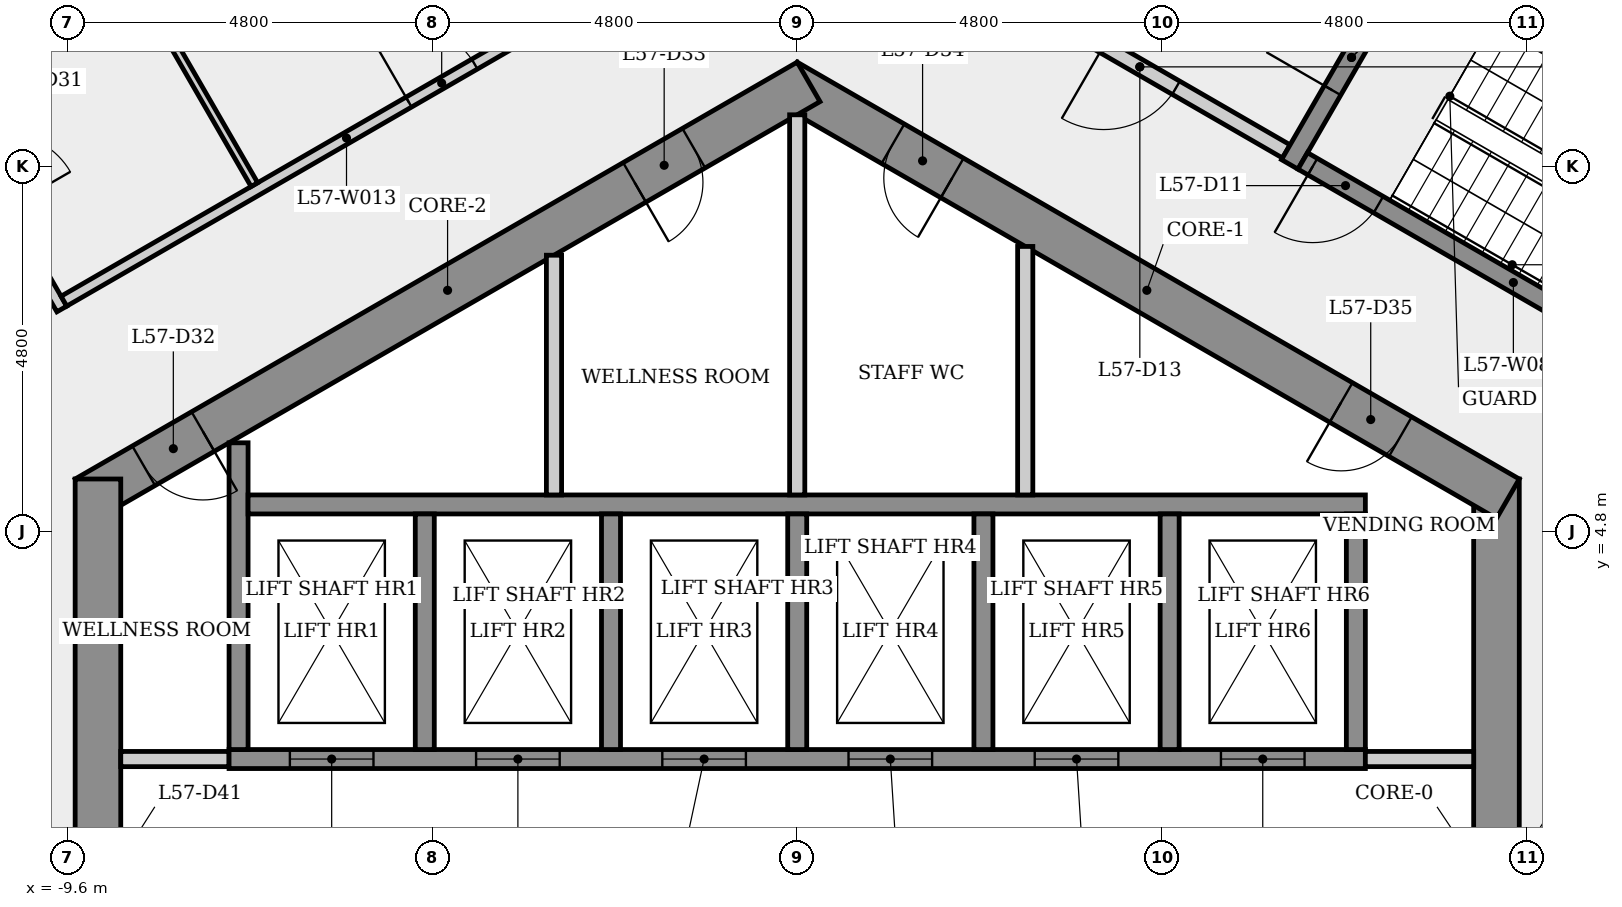
"""IFC4 building model, lengths in metres.
Left out: names, types, materials, properties, quantities, classifications, styles, units other than length and angle.
Written with IfcOpenShell. Run it as: python <this file> out.ifc"""

import sys

from ifc_helpers import new_model, si_unit, direction, frame, frame_2d, origin, place, context, subcontext, project, spatial, rectangle, extrude, element, fill, save


model = new_model("IFC4")
c1 = context("Model", 3, precision=1e-05, world=origin(), true_north=direction((0.0, 1.0)))
c2 = subcontext(c1, "Body", "Model", "MODEL_VIEW")
j1 = project(units=[si_unit("LENGTHUNIT", "METRE"), si_unit("PLANEANGLEUNIT", "RADIAN")], contexts=[c1])
p1 = place(None, origin())
s1 = spatial("IfcSite", under=j1, at=p1, CompositionType="ELEMENT")
p2 = place(p1, origin())
s2 = spatial("IfcBuilding", under=s1, at=p2, CompositionType="ELEMENT")
p3 = place(p2, frame((0.0, 0.0, 214.1)))
s3 = spatial("IfcBuildingStorey", under=s2, at=p3, CompositionType="ELEMENT", Elevation=214.1)
p4 = place(p3, frame((9.2, -5.485, 0.0), z_axis=(0.0, 0.0, 1.0), x_axis=(0.0, 1.0, 0.0)))
e1 = element("IfcWall", 1, at=p4, inside=s3, PredefinedType="SHEAR", context=c2, shape_type="SweptSolid", body=[
    extrude(rectangle(XDim=10.97, YDim=0.6, at=frame_2d((5.485, 0.0))), origin(), (0.0, 0.0, 1.0), 4.8),
])
p5 = place(p4, frame((4.685, 0.0, 0.0)))
e2 = element("IfcOpeningElement", 2, at=p5, cuts=e1, PredefinedType="OPENING", context=c2, shape_type="SweptSolid", body=[
    extrude(rectangle(XDim=1.6, YDim=2.1, at=frame_2d((0.8, 1.05))), frame((0.0, 0.31, 0.0), z_axis=(0.0, -1.0, 0.0), x_axis=(1.0, 0.0, 0.0)), (0.0, 0.0, 1.0), 0.62),
])
p6 = place(p3, frame((9.35, 5.225, 0.0), z_axis=(0.0, 0.0, 1.0), x_axis=(-0.866023993627, 0.500002442456, 0.0)))
e3 = element("IfcWall", 3, at=p6, inside=s3, PredefinedType="SHEAR", context=c2, shape_type="SweptSolid", body=[
    extrude(rectangle(XDim=10.97, YDim=0.6, at=frame_2d((5.485, 0.0))), origin(), (0.0, 0.0, 1.0), 4.8),
])
p7 = place(p6, frame((8.442, 0.0, 0.0)))
e4 = element("IfcOpeningElement", 4, at=p7, cuts=e3, PredefinedType="OPENING", context=c2, shape_type="SweptSolid", body=[
    extrude(rectangle(XDim=0.9, YDim=2.1, at=frame_2d((0.45, 1.05))), frame((0.0, 0.31, 0.0), z_axis=(0.0, -1.0, 0.0), x_axis=(1.0, 0.0, 0.0)), (0.0, 0.0, 1.0), 0.62),
])
p8 = place(p6, frame((1.634, 0.0, 0.0)))
e5 = element("IfcOpeningElement", 5, at=p8, cuts=e3, PredefinedType="OPENING", context=c2, shape_type="SweptSolid", body=[
    extrude(rectangle(XDim=0.9, YDim=2.1, at=frame_2d((0.45, 1.05))), frame((0.0, 0.31, 0.0), z_axis=(0.0, -1.0, 0.0), x_axis=(1.0, 0.0, 0.0)), (0.0, 0.0, 1.0), 0.62),
])
p9 = place(p3, frame((0.15, 10.71, 0.0), z_axis=(0.0, 0.0, 1.0), x_axis=(-0.866023993627, -0.500002442456, 0.0)))
e6 = element("IfcWall", 6, at=p9, inside=s3, PredefinedType="SHEAR", context=c2, shape_type="SweptSolid", body=[
    extrude(rectangle(XDim=10.97, YDim=0.6, at=frame_2d((5.485, 0.0))), origin(), (0.0, 0.0, 1.0), 4.8),
])
p10 = place(p9, frame((9.201, 0.0, 0.0)))
e7 = element("IfcOpeningElement", 7, at=p10, cuts=e6, PredefinedType="OPENING", context=c2, shape_type="SweptSolid", body=[
    extrude(rectangle(XDim=0.9, YDim=2.1, at=frame_2d((0.45, 1.05))), frame((0.0, 0.31, 0.0), z_axis=(0.0, -1.0, 0.0), x_axis=(1.0, 0.0, 0.0)), (0.0, 0.0, 1.0), 0.62),
])
p11 = place(p9, frame((1.744, 0.0, 0.0)))
e8 = element("IfcOpeningElement", 8, at=p11, cuts=e6, PredefinedType="OPENING", context=c2, shape_type="SweptSolid", body=[
    extrude(rectangle(XDim=0.9, YDim=2.1, at=frame_2d((0.45, 1.05))), frame((0.0, 0.31, 0.0), z_axis=(0.0, -1.0, 0.0), x_axis=(1.0, 0.0, 0.0)), (0.0, 0.0, 1.0), 0.62),
])
p12 = place(p3, frame((-9.2, 5.485, 0.0), z_axis=(0.0, 0.0, 1.0), x_axis=(0.0, -1.0, 0.0)))
e9 = element("IfcWall", 9, at=p12, inside=s3, PredefinedType="SHEAR", context=c2, shape_type="SweptSolid", body=[
    extrude(rectangle(XDim=10.97, YDim=0.6, at=frame_2d((5.485, 0.0))), origin(), (0.0, 0.0, 1.0), 4.8),
])
p13 = place(p12, frame((8.516, 0.0, 0.0)))
e10 = element("IfcOpeningElement", 10, at=p13, cuts=e9, PredefinedType="OPENING", context=c2, shape_type="SweptSolid", body=[
    extrude(rectangle(XDim=0.9, YDim=2.1, at=frame_2d((0.45, 1.05))), frame((0.0, 0.31, 0.0), z_axis=(0.0, -1.0, 0.0), x_axis=(1.0, 0.0, 0.0)), (0.0, 0.0, 1.0), 0.62),
])
p14 = place(p12, frame((4.685, 0.0, 0.0)))
e11 = element("IfcOpeningElement", 11, at=p14, cuts=e9, PredefinedType="OPENING", context=c2, shape_type="SweptSolid", body=[
    extrude(rectangle(XDim=1.6, YDim=2.1, at=frame_2d((0.8, 1.05))), frame((0.0, 0.31, 0.0), z_axis=(0.0, -1.0, 0.0), x_axis=(1.0, 0.0, 0.0)), (0.0, 0.0, 1.0), 0.62),
])
p15 = place(p3, frame((-11.646, 11.134, 0.0), z_axis=(0.0, 0.0, 1.0), x_axis=(0.500044270822, -0.865999842505, 0.0)))
e12 = element("IfcWall", 12, at=p15, inside=s3, PredefinedType="PARTITIONING", context=c2, shape_type="SweptSolid", body=[
    extrude(rectangle(XDim=3.94, YDim=0.15, at=frame_2d((1.97, 0.0))), origin(), (0.0, 0.0, 1.0), 4.45),
])
p16 = place(p15, frame((1.433, 0.0, 0.0)))
e13 = element("IfcOpeningElement", 13, at=p16, cuts=e12, PredefinedType="OPENING", context=c2, shape_type="SweptSolid", body=[
    extrude(rectangle(XDim=1.0, YDim=2.1, at=frame_2d((0.5, 1.05))), frame((0.0, 0.085, 0.0), z_axis=(0.0, -1.0, 0.0), x_axis=(1.0, 0.0, 0.0)), (0.0, 0.0, 1.0), 0.17),
])
p17 = place(p3, frame((-9.648, 7.824, 0.0), z_axis=(0.0, 0.0, 1.0), x_axis=(0.866024597333, 0.500001396812, 0.0)))
e14 = element("IfcWall", 14, at=p17, inside=s3, PredefinedType="PARTITIONING", context=c2, shape_type="SweptSolid", body=[
    extrude(rectangle(XDim=8.586, YDim=0.15, at=frame_2d((4.293, 0.0))), origin(), (0.0, 0.0, 1.0), 4.45),
])
p18 = place(p17, frame((5.239, 0.0, 0.0)))
e15 = element("IfcOpeningElement", 15, at=p18, cuts=e14, PredefinedType="OPENING", context=c2, shape_type="SweptSolid", body=[
    extrude(rectangle(XDim=1.0, YDim=2.1, at=frame_2d((0.5, 1.05))), frame((0.0, 0.085, 0.0), z_axis=(0.0, -1.0, 0.0), x_axis=(1.0, 0.0, 0.0)), (0.0, 0.0, 1.0), 0.17),
])
p19 = place(p3, frame((-8.9, 1.8, 0.0), z_axis=(0.0, 0.0, 1.0), x_axis=(1.0, 0.0, 0.0)))
e16 = element("IfcWall", 16, at=p19, inside=s3, PredefinedType="PARTITIONING", context=c2, shape_type="SweptSolid", body=[
    extrude(rectangle(XDim=1.425, YDim=0.2, at=frame_2d((0.712, 0.0))), origin(), (0.0, 0.0, 1.0), 4.45),
])
p20 = place(p3, frame((-7.475, 1.8, 0.0), z_axis=(0.0, 0.0, 1.0), x_axis=(1.0, 0.0, 0.0)))
e17 = element("IfcWall", 17, at=p20, inside=s3, PredefinedType="SHEAR", context=c2, shape_type="SweptSolid", body=[
    extrude(rectangle(XDim=14.95, YDim=0.25, at=frame_2d((7.475, 0.0))), origin(), (0.0, 0.0, 1.0), 4.45),
])
p21 = place(p20, frame((0.8, 0.0, 0.0)))
e18 = element("IfcOpeningElement", 18, at=p21, cuts=e17, PredefinedType="OPENING", context=c2, shape_type="SweptSolid", body=[
    extrude(rectangle(XDim=1.1, YDim=2.1, at=frame_2d((0.55, 1.05))), frame((0.0, 0.135, 0.0), z_axis=(0.0, -1.0, 0.0), x_axis=(1.0, 0.0, 0.0)), (0.0, 0.0, 1.0), 0.27),
])
p22 = place(p20, frame((3.25, 0.0, 0.0)))
e19 = element("IfcOpeningElement", 19, at=p22, cuts=e17, PredefinedType="OPENING", context=c2, shape_type="SweptSolid", body=[
    extrude(rectangle(XDim=1.1, YDim=2.1, at=frame_2d((0.55, 1.05))), frame((0.0, 0.135, 0.0), z_axis=(0.0, -1.0, 0.0), x_axis=(1.0, 0.0, 0.0)), (0.0, 0.0, 1.0), 0.27),
])
p23 = place(p20, frame((5.7, 0.0, 0.0)))
e20 = element("IfcOpeningElement", 20, at=p23, cuts=e17, PredefinedType="OPENING", context=c2, shape_type="SweptSolid", body=[
    extrude(rectangle(XDim=1.1, YDim=2.1, at=frame_2d((0.55, 1.05))), frame((0.0, 0.135, 0.0), z_axis=(0.0, -1.0, 0.0), x_axis=(1.0, 0.0, 0.0)), (0.0, 0.0, 1.0), 0.27),
])
p24 = place(p20, frame((8.15, 0.0, 0.0)))
e21 = element("IfcOpeningElement", 21, at=p24, cuts=e17, PredefinedType="OPENING", context=c2, shape_type="SweptSolid", body=[
    extrude(rectangle(XDim=1.1, YDim=2.1, at=frame_2d((0.55, 1.05))), frame((0.0, 0.135, 0.0), z_axis=(0.0, -1.0, 0.0), x_axis=(1.0, 0.0, 0.0)), (0.0, 0.0, 1.0), 0.27),
])
p25 = place(p20, frame((10.6, 0.0, 0.0)))
e22 = element("IfcOpeningElement", 22, at=p25, cuts=e17, PredefinedType="OPENING", context=c2, shape_type="SweptSolid", body=[
    extrude(rectangle(XDim=1.1, YDim=2.1, at=frame_2d((0.55, 1.05))), frame((0.0, 0.135, 0.0), z_axis=(0.0, -1.0, 0.0), x_axis=(1.0, 0.0, 0.0)), (0.0, 0.0, 1.0), 0.27),
])
p26 = place(p20, frame((13.05, 0.0, 0.0)))
e23 = element("IfcOpeningElement", 23, at=p26, cuts=e17, PredefinedType="OPENING", context=c2, shape_type="SweptSolid", body=[
    extrude(rectangle(XDim=1.1, YDim=2.1, at=frame_2d((0.55, 1.05))), frame((0.0, 0.135, 0.0), z_axis=(0.0, -1.0, 0.0), x_axis=(1.0, 0.0, 0.0)), (0.0, 0.0, 1.0), 0.27),
])
p27 = place(p3, frame((-7.35, 1.925, 0.0), z_axis=(0.0, 0.0, 1.0), x_axis=(0.0, 1.0, 0.0)))
e24 = element("IfcWall", 24, at=p27, inside=s3, PredefinedType="SHEAR", context=c2, shape_type="SweptSolid", body=[
    extrude(rectangle(XDim=4.036, YDim=0.25, at=frame_2d((2.018, 0.0))), origin(), (0.0, 0.0, 1.0), 4.45),
])
p28 = place(p3, frame((-7.225, 5.15, 0.0), z_axis=(0.0, 0.0, 1.0), x_axis=(1.0, 0.0, 0.0)))
e25 = element("IfcWall", 25, at=p28, inside=s3, PredefinedType="SHEAR", context=c2, shape_type="SweptSolid", body=[
    extrude(rectangle(XDim=14.7, YDim=0.25, at=frame_2d((7.35, 0.0))), origin(), (0.0, 0.0, 1.0), 4.45),
])
p29 = place(p3, frame((-7.142, 9.358, 0.0), z_axis=(0.0, 0.0, 1.0), x_axis=(-0.500010221068, 0.866019502567, 0.0)))
e26 = element("IfcWall", 26, at=p29, inside=s3, PredefinedType="PARTITIONING", context=c2, shape_type="SweptSolid", body=[
    extrude(rectangle(XDim=6.511, YDim=0.1, at=frame_2d((3.256, 0.0))), origin(), (0.0, 0.0, 1.0), 2.825),
])
p30 = place(p3, frame((-4.9, 5.025, 0.0), z_axis=(0.0, 0.0, 1.0), x_axis=(0.0, -1.0, 0.0)))
e27 = element("IfcWall", 27, at=p30, inside=s3, PredefinedType="SHEAR", context=c2, shape_type="SweptSolid", body=[
    extrude(rectangle(XDim=3.1, YDim=0.25, at=frame_2d((1.55, 0.0))), origin(), (0.0, 0.0, 1.0), 4.8),
])
p31 = place(p3, frame((-3.2, 8.429, 0.0), z_axis=(0.0, 0.0, 1.0), x_axis=(0.0, -1.0, 0.0)))
e28 = element("IfcWall", 28, at=p31, inside=s3, PredefinedType="PARTITIONING", context=c2, shape_type="SweptSolid", body=[
    extrude(rectangle(XDim=3.154, YDim=0.2, at=frame_2d((1.577, 0.0))), origin(), (0.0, 0.0, 1.0), 4.45),
])
for number, where, z_axis, x_axis in (
    (29, (-2.45, 5.025, 0.0), (0.0, 0.0, 1.0), (0.0, -1.0, 0.0)),
    (30, (0.0, 5.025, 0.0), (0.0, 0.0, 1.0), (0.0, -1.0, 0.0)),
):
    element("IfcWall", number, at=place(p3, frame(where, z_axis=z_axis, x_axis=x_axis)), inside=s3, PredefinedType="SHEAR", context=c2, shape_type="SweptSolid", body=[
        extrude(rectangle(XDim=3.1, YDim=0.25, at=frame_2d((1.55, 0.0))), origin(), (0.0, 0.0, 1.0), 4.8),
    ])
p32 = place(p3, frame((0.0, 10.277, 0.0), z_axis=(0.0, 0.0, 1.0), x_axis=(0.0, -1.0, 0.0)))
e31 = element("IfcWall", 31, at=p32, inside=s3, PredefinedType="PARTITIONING", context=c2, shape_type="SweptSolid", body=[
    extrude(rectangle(XDim=5.002, YDim=0.2, at=frame_2d((2.501, 0.0))), origin(), (0.0, 0.0, 1.0), 4.45),
])
p33 = place(p3, frame((2.45, 5.025, 0.0), z_axis=(0.0, 0.0, 1.0), x_axis=(0.0, -1.0, 0.0)))
e32 = element("IfcWall", 32, at=p33, inside=s3, PredefinedType="SHEAR", context=c2, shape_type="SweptSolid", body=[
    extrude(rectangle(XDim=3.1, YDim=0.25, at=frame_2d((1.55, 0.0))), origin(), (0.0, 0.0, 1.0), 4.8),
])
p34 = place(p3, frame((3.0, 8.545, 0.0), z_axis=(0.0, 0.0, 1.0), x_axis=(0.0, -1.0, 0.0)))
e33 = element("IfcWall", 33, at=p34, inside=s3, PredefinedType="PARTITIONING", context=c2, shape_type="SweptSolid", body=[
    extrude(rectangle(XDim=3.27, YDim=0.2, at=frame_2d((1.635, 0.0))), origin(), (0.0, 0.0, 1.0), 4.45),
])
p35 = place(p3, frame((4.9, 5.025, 0.0), z_axis=(0.0, 0.0, 1.0), x_axis=(0.0, -1.0, 0.0)))
e34 = element("IfcWall", 34, at=p35, inside=s3, PredefinedType="SHEAR", context=c2, shape_type="SweptSolid", body=[
    extrude(rectangle(XDim=3.1, YDim=0.25, at=frame_2d((1.55, 0.0))), origin(), (0.0, 0.0, 1.0), 4.8),
])
p36 = place(p3, frame((6.435, 9.795, 0.0), z_axis=(0.0, 0.0, 1.0), x_axis=(-0.866012907634, 0.500021643343, 0.0)))
e35 = element("IfcWall", 35, at=p36, inside=s3, PredefinedType="PARTITIONING", context=c2, shape_type="SweptSolid", body=[
    extrude(rectangle(XDim=4.45, YDim=0.2, at=frame_2d((2.225, 0.0))), origin(), (0.0, 0.0, 1.0), 4.45),
])
p37 = place(p36, frame((1.675, 0.0, 0.0)))
e36 = element("IfcOpeningElement", 36, at=p37, cuts=e35, PredefinedType="OPENING", context=c2, shape_type="SweptSolid", body=[
    extrude(rectangle(XDim=1.1, YDim=2.1, at=frame_2d((0.55, 1.05))), frame((0.0, 0.11, 0.0), z_axis=(0.0, -1.0, 0.0), x_axis=(1.0, 0.0, 0.0)), (0.0, 0.0, 1.0), 0.22),
])
p38 = place(p3, frame((6.48, 9.624, 0.0), z_axis=(0.0, 0.0, 1.0), x_axis=(0.500017246033, 0.866015446554, 0.0)))
e37 = element("IfcWall", 37, at=p38, inside=s3, PredefinedType="SHEAR", context=c2, shape_type="SweptSolid", body=[
    extrude(rectangle(XDim=3.25, YDim=0.25, at=frame_2d((1.625, 0.0))), origin(), (0.0, 0.0, 1.0), 4.45),
])
p39 = place(p38, frame((1.125, 0.0, 0.0)))
e38 = element("IfcOpeningElement", 38, at=p39, cuts=e37, PredefinedType="OPENING", context=c2, shape_type="SweptSolid", body=[
    extrude(rectangle(XDim=1.0, YDim=2.1, at=frame_2d((0.5, 1.05))), frame((0.0, 0.135, 0.0), z_axis=(0.0, -1.0, 0.0), x_axis=(1.0, 0.0, 0.0)), (0.0, 0.0, 1.0), 0.27),
])
p40 = place(p3, frame((7.475, 1.8, 0.0), z_axis=(0.0, 0.0, 1.0), x_axis=(1.0, 0.0, 0.0)))
e39 = element("IfcWall", 39, at=p40, inside=s3, PredefinedType="PARTITIONING", context=c2, shape_type="SweptSolid", body=[
    extrude(rectangle(XDim=1.425, YDim=0.2, at=frame_2d((0.712, 0.0))), origin(), (0.0, 0.0, 1.0), 4.45),
])
p41 = place(p3, frame((7.35, 5.025, 0.0), z_axis=(0.0, 0.0, 1.0), x_axis=(0.0, -1.0, 0.0)))
e40 = element("IfcWall", 40, at=p41, inside=s3, PredefinedType="SHEAR", context=c2, shape_type="SweptSolid", body=[
    extrude(rectangle(XDim=3.1, YDim=0.25, at=frame_2d((1.55, 0.0))), origin(), (0.0, 0.0, 1.0), 4.8),
])
p42 = place(p3, frame((8.151, 12.268, 0.0), z_axis=(0.0, 0.0, 1.0), x_axis=(0.866025499775, -0.499999833739, 0.0)))
e41 = element("IfcWall", 41, at=p42, inside=s3, PredefinedType="SHEAR", context=c2, shape_type="SweptSolid", body=[
    extrude(rectangle(XDim=6.4, YDim=0.25, at=frame_2d((3.2, 0.0))), origin(), (0.0, 0.0, 1.0), 4.45),
])
p43 = place(p3, frame((12.194, 6.47, 0.0), z_axis=(0.0, 0.0, 1.0), x_axis=(-0.866025499775, 0.499999833739, 0.0)))
e42 = element("IfcWall", 42, at=p43, inside=s3, PredefinedType="SHEAR", context=c2, shape_type="SweptSolid", body=[
    extrude(rectangle(XDim=6.4, YDim=0.25, at=frame_2d((3.2, 0.0))), origin(), (0.0, 0.0, 1.0), 4.45),
])
p44 = place(p43, frame((5.25, 0.0, 0.0)))
e43 = element("IfcOpeningElement", 43, at=p44, cuts=e42, PredefinedType="OPENING", context=c2, shape_type="SweptSolid", body=[
    extrude(rectangle(XDim=1.0, YDim=2.1, at=frame_2d((0.5, 1.05))), frame((0.0, 0.135, 0.0), z_axis=(0.0, -1.0, 0.0), x_axis=(1.0, 0.0, 0.0)), (0.0, 0.0, 1.0), 0.27),
])
p45 = place(p21, origin())
e44 = element("IfcDoor", 44, at=p45, inside=s3, OperationType="SLIDING_TO_LEFT", PredefinedType="DOOR", context=c2, shape_type="SweptSolid", body=[
    extrude(rectangle(XDim=1.1, YDim=2.1, at=frame_2d((0.55, 1.05))), frame((0.0, 0.025, 0.0), z_axis=(0.0, -1.0, 0.0), x_axis=(1.0, 0.0, 0.0)), (0.0, 0.0, 1.0), 0.05),
])
fill(e18, e44)
p46 = place(p22, origin())
e45 = element("IfcDoor", 45, at=p46, inside=s3, OperationType="SLIDING_TO_LEFT", PredefinedType="DOOR", context=c2, shape_type="SweptSolid", body=[
    extrude(rectangle(XDim=1.1, YDim=2.1, at=frame_2d((0.55, 1.05))), frame((0.0, 0.025, 0.0), z_axis=(0.0, -1.0, 0.0), x_axis=(1.0, 0.0, 0.0)), (0.0, 0.0, 1.0), 0.05),
])
fill(e19, e45)
p47 = place(p23, origin())
e46 = element("IfcDoor", 46, at=p47, inside=s3, OperationType="SLIDING_TO_LEFT", PredefinedType="DOOR", context=c2, shape_type="SweptSolid", body=[
    extrude(rectangle(XDim=1.1, YDim=2.1, at=frame_2d((0.55, 1.05))), frame((0.0, 0.025, 0.0), z_axis=(0.0, -1.0, 0.0), x_axis=(1.0, 0.0, 0.0)), (0.0, 0.0, 1.0), 0.05),
])
fill(e20, e46)
p48 = place(p24, origin())
e47 = element("IfcDoor", 47, at=p48, inside=s3, OperationType="SLIDING_TO_LEFT", PredefinedType="DOOR", context=c2, shape_type="SweptSolid", body=[
    extrude(rectangle(XDim=1.1, YDim=2.1, at=frame_2d((0.55, 1.05))), frame((0.0, 0.025, 0.0), z_axis=(0.0, -1.0, 0.0), x_axis=(1.0, 0.0, 0.0)), (0.0, 0.0, 1.0), 0.05),
])
fill(e21, e47)
p49 = place(p25, origin())
e48 = element("IfcDoor", 48, at=p49, inside=s3, OperationType="SLIDING_TO_LEFT", PredefinedType="DOOR", context=c2, shape_type="SweptSolid", body=[
    extrude(rectangle(XDim=1.1, YDim=2.1, at=frame_2d((0.55, 1.05))), frame((0.0, 0.025, 0.0), z_axis=(0.0, -1.0, 0.0), x_axis=(1.0, 0.0, 0.0)), (0.0, 0.0, 1.0), 0.05),
])
fill(e22, e48)
p50 = place(p26, origin())
e49 = element("IfcDoor", 49, at=p50, inside=s3, OperationType="SLIDING_TO_LEFT", PredefinedType="DOOR", context=c2, shape_type="SweptSolid", body=[
    extrude(rectangle(XDim=1.1, YDim=2.1, at=frame_2d((0.55, 1.05))), frame((0.0, 0.025, 0.0), z_axis=(0.0, -1.0, 0.0), x_axis=(1.0, 0.0, 0.0)), (0.0, 0.0, 1.0), 0.05),
])
fill(e23, e49)
p51 = place(p44, origin())
e50 = element("IfcDoor", 50, at=p51, inside=s3, OperationType="SINGLE_SWING_RIGHT", PredefinedType="DOOR", context=c2, shape_type="SweptSolid", body=[
    extrude(rectangle(XDim=1.0, YDim=2.1, at=frame_2d((0.5, 1.05))), frame((0.0, 0.025, 0.0), z_axis=(0.0, -1.0, 0.0), x_axis=(1.0, 0.0, 0.0)), (0.0, 0.0, 1.0), 0.05),
])
fill(e43, e50)
p52 = place(p39, origin())
e51 = element("IfcDoor", 51, at=p52, inside=s3, OperationType="SINGLE_SWING_LEFT", PredefinedType="DOOR", context=c2, shape_type="SweptSolid", body=[
    extrude(rectangle(XDim=1.0, YDim=2.1, at=frame_2d((0.5, 1.05))), frame((0.0, 0.025, 0.0), z_axis=(0.0, -1.0, 0.0), x_axis=(1.0, 0.0, 0.0)), (0.0, 0.0, 1.0), 0.05),
])
fill(e38, e51)
p53 = place(p37, origin())
e52 = element("IfcDoor", 52, at=p53, inside=s3, OperationType="SINGLE_SWING_RIGHT", PredefinedType="DOOR", context=c2, shape_type="SweptSolid", body=[
    extrude(rectangle(XDim=1.1, YDim=2.1, at=frame_2d((0.55, 1.05))), frame((0.0, 0.025, 0.0), z_axis=(0.0, -1.0, 0.0), x_axis=(1.0, 0.0, 0.0)), (0.0, 0.0, 1.0), 0.05),
])
fill(e36, e52)
p54 = place(p18, origin())
e53 = element("IfcDoor", 53, at=p54, inside=s3, OperationType="SINGLE_SWING_LEFT", PredefinedType="DOOR", context=c2, shape_type="SweptSolid", body=[
    extrude(rectangle(XDim=1.0, YDim=2.1, at=frame_2d((0.5, 1.05))), frame((0.0, 0.025, 0.0), z_axis=(0.0, -1.0, 0.0), x_axis=(1.0, 0.0, 0.0)), (0.0, 0.0, 1.0), 0.05),
])
fill(e15, e53)
p55 = place(p10, origin())
e54 = element("IfcDoor", 54, at=p55, inside=s3, OperationType="SINGLE_SWING_LEFT", PredefinedType="DOOR", context=c2, shape_type="SweptSolid", body=[
    extrude(rectangle(XDim=0.9, YDim=2.1, at=frame_2d((0.45, 1.05))), frame((0.0, 0.025, 0.0), z_axis=(0.0, -1.0, 0.0), x_axis=(1.0, 0.0, 0.0)), (0.0, 0.0, 1.0), 0.05),
])
fill(e7, e54)
p56 = place(p11, origin())
e55 = element("IfcDoor", 55, at=p56, inside=s3, OperationType="SINGLE_SWING_RIGHT", PredefinedType="DOOR", context=c2, shape_type="SweptSolid", body=[
    extrude(rectangle(XDim=0.9, YDim=2.1, at=frame_2d((0.45, 1.05))), frame((0.0, 0.025, 0.0), z_axis=(0.0, -1.0, 0.0), x_axis=(1.0, 0.0, 0.0)), (0.0, 0.0, 1.0), 0.05),
])
fill(e8, e55)
p57 = place(p7, origin())
e56 = element("IfcDoor", 56, at=p57, inside=s3, OperationType="SINGLE_SWING_LEFT", PredefinedType="DOOR", context=c2, shape_type="SweptSolid", body=[
    extrude(rectangle(XDim=0.9, YDim=2.1, at=frame_2d((0.45, 1.05))), frame((0.0, 0.025, 0.0), z_axis=(0.0, -1.0, 0.0), x_axis=(1.0, 0.0, 0.0)), (0.0, 0.0, 1.0), 0.05),
])
fill(e4, e56)
p58 = place(p8, origin())
e57 = element("IfcDoor", 57, at=p58, inside=s3, OperationType="SINGLE_SWING_RIGHT", PredefinedType="DOOR", context=c2, shape_type="SweptSolid", body=[
    extrude(rectangle(XDim=0.9, YDim=2.1, at=frame_2d((0.45, 1.05))), frame((0.0, 0.025, 0.0), z_axis=(0.0, -1.0, 0.0), x_axis=(1.0, 0.0, 0.0)), (0.0, 0.0, 1.0), 0.05),
])
fill(e5, e57)
save(model, sys.argv[1])
